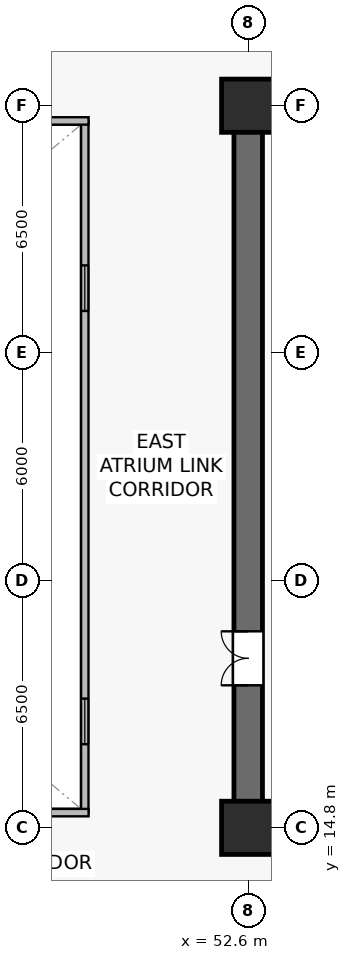
"""IFC4 building model, lengths in metres.
Left out: names, types, materials, properties, quantities, classifications, styles, units other than length and angle.
Written with IfcOpenShell. Run it as: python <this file> out.ifc"""

import sys

from ifc_helpers import new_model, si_unit, direction, frame, frame_2d, origin, origin_2d, place, context, subcontext, project, spatial, rectangle, extrude, source, transform, mapped, element, fill, save


model = new_model("IFC4")
c1 = context("Model", 3, precision=1e-05, world=origin(), true_north=direction((0.0, 1.0)))
c2 = subcontext(c1, "Body", "Model", "MODEL_VIEW")
j1 = project(units=[si_unit("LENGTHUNIT", "METRE"), si_unit("PLANEANGLEUNIT", "RADIAN")], contexts=[c1])
p1 = place(None, origin())
s1 = spatial("IfcSite", under=j1, at=p1, CompositionType="ELEMENT")
p2 = place(p1, origin())
s2 = spatial("IfcBuilding", under=s1, at=p2, CompositionType="ELEMENT")
p3 = place(p2, frame((0.0, 0.0, 29.3)))
s3 = spatial("IfcBuildingStorey", under=s2, at=p3, CompositionType="ELEMENT", Elevation=29.3)
p4 = place(p3, frame((52.225, 14.8, 0.0), z_axis=(0.0, 0.0, 1.0), x_axis=(1.0, 0.0, 0.0)))
e1 = element("IfcWall", 1, at=p4, inside=s3, PredefinedType="SHEAR", context=c2, shape_type="SweptSolid", body=[
    extrude(rectangle(XDim=15.55, YDim=0.75, at=frame_2d((7.775, 0.0))), origin(), (0.0, 0.0, 1.0), 3.78),
])
p5 = place(p3, frame((52.225, 33.8, 0.0), z_axis=(0.0, 0.0, 1.0), x_axis=(1.0, 0.0, 0.0)))
e2 = element("IfcWall", 2, at=p5, inside=s3, PredefinedType="SHEAR", context=c2, shape_type="SweptSolid", body=[
    extrude(rectangle(XDim=15.55, YDim=0.75, at=frame_2d((7.775, 0.0))), origin(), (0.0, 0.0, 1.0), 3.78),
])
p6 = place(p5, frame((8.875, 0.0, 0.0)))
e3 = element("IfcOpeningElement", 3, at=p6, cuts=e2, PredefinedType="OPENING", context=c2, shape_type="SweptSolid", body=[
    extrude(rectangle(XDim=0.95, YDim=2.15, at=frame_2d((0.475, 1.075))), frame((0.0, 0.385, 0.0), z_axis=(0.0, -1.0, 0.0), x_axis=(1.0, 0.0, 0.0)), (0.0, 0.0, 1.0), 0.77),
])
p7 = place(p5, frame((5.51, 0.0, 0.0)))
e4 = element("IfcOpeningElement", 4, at=p7, cuts=e2, PredefinedType="OPENING", context=c2, shape_type="SweptSolid", body=[
    extrude(rectangle(XDim=0.95, YDim=2.15, at=frame_2d((0.475, 1.075))), frame((0.0, 0.385, 0.0), z_axis=(0.0, -1.0, 0.0), x_axis=(1.0, 0.0, 0.0)), (0.0, 0.0, 1.0), 0.77),
])
p8 = place(p5, frame((2.11, 0.0, 0.0)))
e5 = element("IfcOpeningElement", 5, at=p8, cuts=e2, PredefinedType="OPENING", context=c2, shape_type="SweptSolid", body=[
    extrude(rectangle(XDim=0.95, YDim=2.15, at=frame_2d((0.475, 1.075))), frame((0.0, 0.385, 0.0), z_axis=(0.0, -1.0, 0.0), x_axis=(1.0, 0.0, 0.0)), (0.0, 0.0, 1.0), 0.77),
])
p9 = place(p3, frame((52.6, 15.175, 0.0), z_axis=(0.0, 0.0, 1.0), x_axis=(0.0, 1.0, 0.0)))
e6 = element("IfcWall", 6, at=p9, inside=s3, PredefinedType="SHEAR", context=c2, shape_type="SweptSolid", body=[
    extrude(rectangle(XDim=18.25, YDim=0.75, at=frame_2d((9.125, 0.0))), origin(), (0.0, 0.0, 1.0), 3.78),
])
p10 = place(p9, frame((3.375, 0.0, 0.0)))
e7 = element("IfcOpeningElement", 7, at=p10, cuts=e6, PredefinedType="OPENING", context=c2, shape_type="SweptSolid", body=[
    extrude(rectangle(XDim=1.42, YDim=2.2, at=frame_2d((0.71, 1.1))), frame((0.0, 0.385, 0.0), z_axis=(0.0, -1.0, 0.0), x_axis=(1.0, 0.0, 0.0)), (0.0, 0.0, 1.0), 0.77),
])
m1 = source(origin(), c2, "Body", "SweptSolid", [
    extrude(rectangle(XDim=1.4, YDim=1.4, at=origin_2d()), origin(), (0.0, 0.0, 1.0), 4.1),
])
for number, where, z_axis, x_axis in (
    (8, (52.6, 14.8, 0.0), (0.0, 0.0, 1.0), (1.0, 0.0, 0.0)),
    (9, (52.6, 33.8, 0.0), (0.0, 0.0, 1.0), (1.0, 0.0, 0.0)),
):
    element("IfcColumn", number, at=place(p3, frame(where, z_axis=z_axis, x_axis=x_axis)), inside=s3, PredefinedType="COLUMN", context=c2, shape_type="MappedRepresentation", body=[
        mapped(m1, transform((0.0, 0.0, 0.0), scale=1.0)),
    ])
p11 = place(p3, frame((48.3, 15.2, 0.0), z_axis=(0.0, 0.0, 1.0), x_axis=(0.0, 1.0, 0.0)))
e10 = element("IfcWall", 10, at=p11, inside=s3, PredefinedType="SOLIDWALL", context=c2, shape_type="SweptSolid", body=[
    extrude(rectangle(XDim=18.2, YDim=0.195, at=frame_2d((9.1, 0.0))), origin(), (0.0, 0.0, 1.0), 3.78),
])
p12 = place(p11, frame((1.8, 0.0, 0.9)))
e11 = element("IfcOpeningElement", 11, at=p12, cuts=e10, PredefinedType="OPENING", context=c2, shape_type="SweptSolid", body=[
    extrude(rectangle(XDim=1.2, YDim=1.35, at=frame_2d((0.6, 0.675))), frame((0.0, 0.107, 0.0), z_axis=(0.0, -1.0, 0.0), x_axis=(1.0, 0.0, 0.0)), (0.0, 0.0, 1.0), 0.215),
])
p13 = place(p11, frame((13.2, 0.0, 0.9)))
e12 = element("IfcOpeningElement", 12, at=p13, cuts=e10, PredefinedType="OPENING", context=c2, shape_type="SweptSolid", body=[
    extrude(rectangle(XDim=1.2, YDim=1.35, at=frame_2d((0.6, 0.675))), frame((0.0, 0.107, 0.0), z_axis=(0.0, -1.0, 0.0), x_axis=(1.0, 0.0, 0.0)), (0.0, 0.0, 1.0), 0.215),
])
for number, where, z_axis, x_axis in (
    (13, (26.4, 15.2, 0.0), (0.0, 0.0, 1.0), (1.0, 0.0, 0.0)),
    (14, (26.4, 33.4, 0.0), (0.0, 0.0, 1.0), (1.0, 0.0, 0.0)),
):
    element("IfcWall", number, at=place(p3, frame(where, z_axis=z_axis, x_axis=x_axis)), inside=s3, PredefinedType="SOLIDWALL", context=c2, shape_type="SweptSolid", body=[
        extrude(rectangle(XDim=22.0, YDim=0.195, at=frame_2d((11.0, 0.0))), origin(), (0.0, 0.0, 1.0), 3.78),
    ])
m2 = source(origin(), c2, "Body", "SweptSolid", [
    extrude(rectangle(XDim=1.2, YDim=1.35, at=frame_2d((0.6, 0.675))), frame((0.0, 0.03, 0.0), z_axis=(0.0, -1.0, 0.0), x_axis=(1.0, 0.0, 0.0)), (0.0, 0.0, 1.0), 0.06),
])
p14 = place(p12, origin())
e15 = element("IfcWindow", 15, at=p14, inside=s3, PartitioningType="SINGLE_PANEL", PredefinedType="WINDOW", context=c2, shape_type="MappedRepresentation", body=[
    mapped(m2, transform((0.0, 0.0, 0.0), scale=1.0)),
])
fill(e11, e15)
p15 = place(p13, origin())
e16 = element("IfcWindow", 16, at=p15, inside=s3, PartitioningType="SINGLE_PANEL", PredefinedType="WINDOW", context=c2, shape_type="MappedRepresentation", body=[
    mapped(m2, transform((0.0, 0.0, 0.0), scale=1.0)),
])
fill(e12, e16)
m3 = source(origin(), c2, "Body", "SweptSolid", [
    extrude(rectangle(XDim=1.42, YDim=2.2, at=frame_2d((0.71, 1.1))), frame((0.0, 0.025, 0.0), z_axis=(0.0, -1.0, 0.0), x_axis=(1.0, 0.0, 0.0)), (0.0, 0.0, 1.0), 0.05),
])
p16 = place(p10, origin())
e17 = element("IfcDoor", 17, at=p16, inside=s3, OperationType="DOUBLE_DOOR_SINGLE_SWING", PredefinedType="DOOR", context=c2, shape_type="MappedRepresentation", body=[
    mapped(m3, transform((0.0, 0.0, 0.0), scale=1.0)),
])
fill(e7, e17)
save(model, sys.argv[1])
